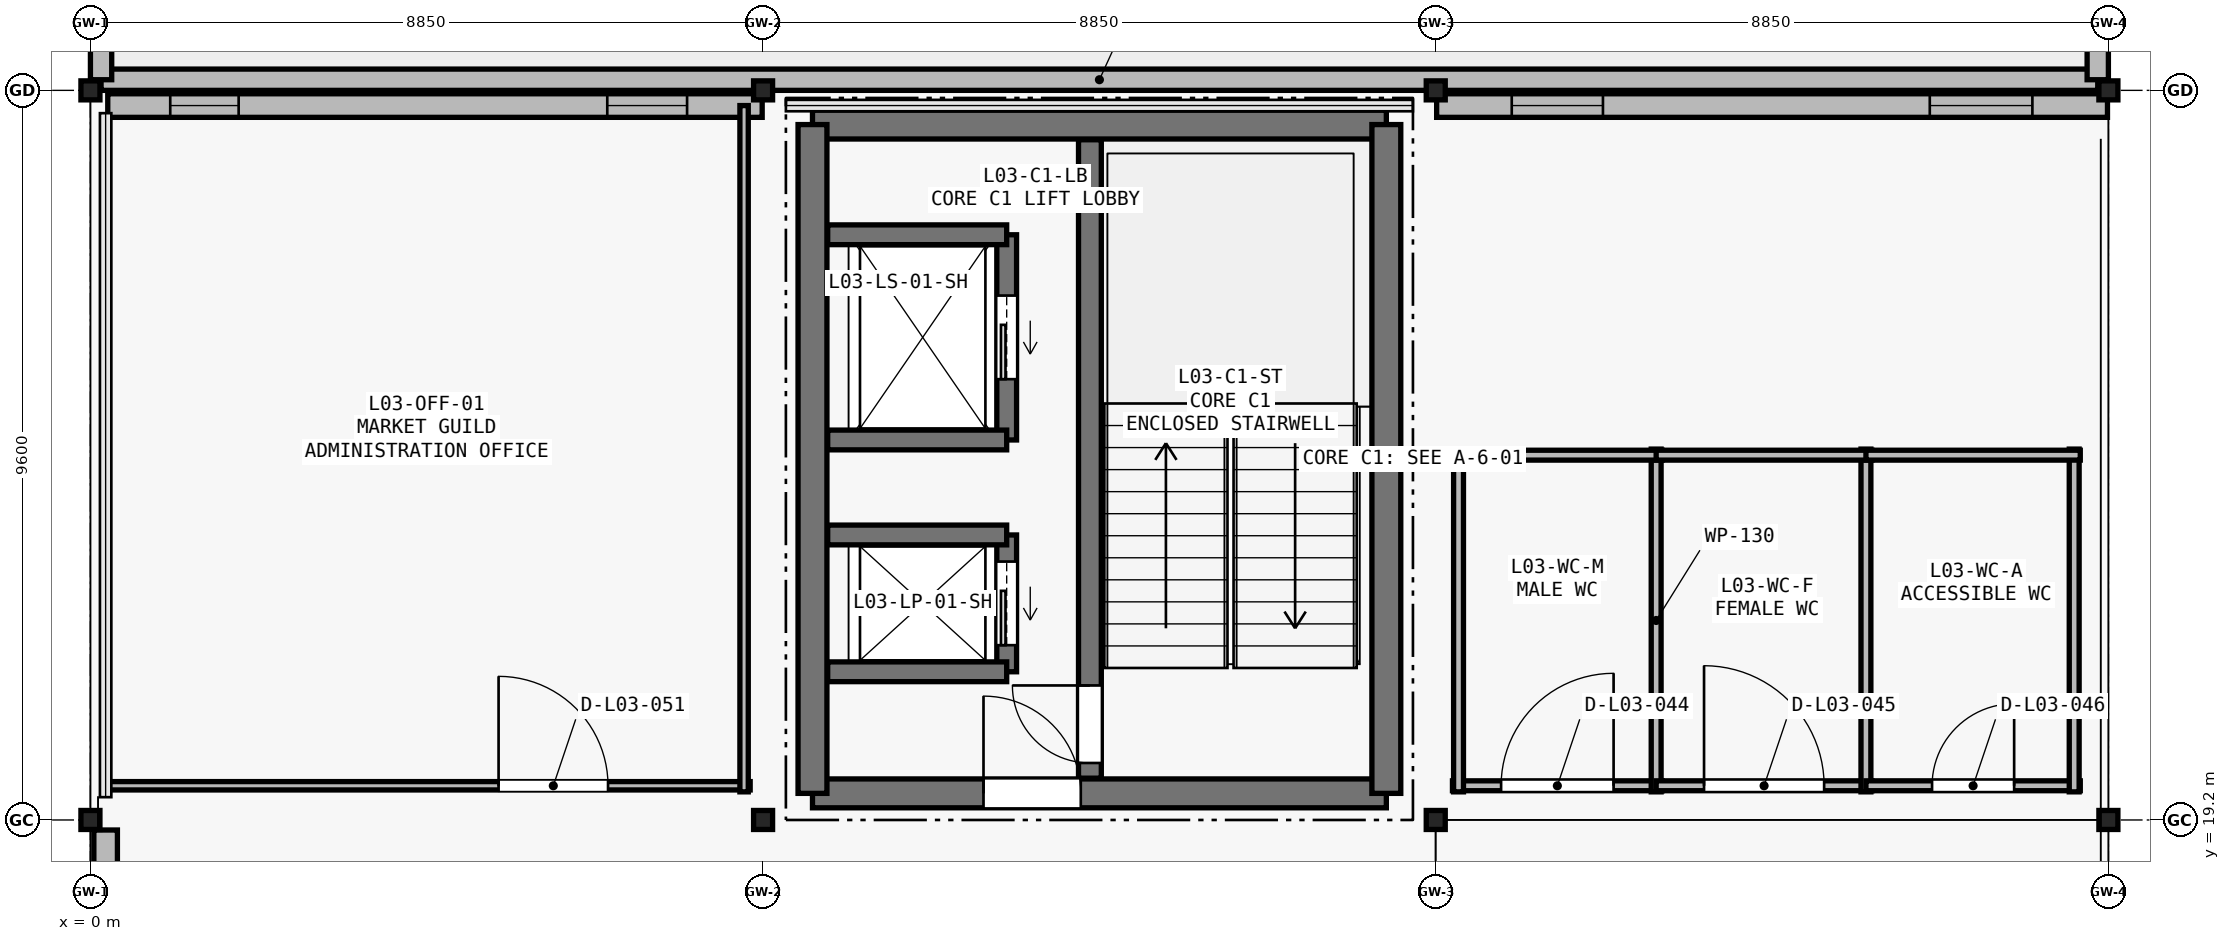
"""IFC4 building model, lengths in metres.
Left out: names, types, materials, properties, quantities, classifications, styles, units other than length and angle.
Written with IfcOpenShell. Run it as: python <this file> out.ifc"""

import sys

from ifc_helpers import new_model, si_unit, direction, frame, frame_2d, origin, origin_2d, place, context, subcontext, project, spatial, rectangle, i_section, extrude, element, fill, save


model = new_model("IFC4")
c1 = context("Model", 3, precision=1e-05, world=origin(), true_north=direction((0.0, 1.0)))
c2 = subcontext(c1, "Body", "Model", "MODEL_VIEW")
j1 = project(units=[si_unit("LENGTHUNIT", "METRE"), si_unit("PLANEANGLEUNIT", "RADIAN")], contexts=[c1])
p1 = place(None, origin())
s1 = spatial("IfcSite", under=j1, at=p1, CompositionType="ELEMENT")
p2 = place(p1, origin())
s2 = spatial("IfcBuilding", under=s1, at=p2, CompositionType="ELEMENT")
p3 = place(p2, frame((0.0, 0.0, 15.0)))
s3 = spatial("IfcBuildingStorey", under=s2, at=p3, CompositionType="ELEMENT", Elevation=15.0)
for number, where, z_axis, x_axis in (
    (1, (0.0, 19.2, 0.0), (0.0, 0.0, 1.0), (1.0, 0.0, 0.0)),
    (2, (0.0, 28.8, 0.0), (0.0, 0.0, 1.0), (1.0, 0.0, 0.0)),
    (3, (8.85, 19.2, 0.0), (0.0, 0.0, 1.0), (1.0, 0.0, 0.0)),
    (4, (8.85, 28.8, 0.0), (0.0, 0.0, 1.0), (1.0, 0.0, 0.0)),
    (5, (17.7, 19.2, 0.0), (0.0, 0.0, 1.0), (1.0, 0.0, 0.0)),
    (6, (17.7, 28.8, 0.0), (0.0, 0.0, 1.0), (1.0, 0.0, 0.0)),
    (7, (26.55, 19.2, 0.0), (0.0, 0.0, 1.0), (1.0, 0.0, 0.0)),
    (8, (26.55, 28.8, 0.0), (0.0, 0.0, 1.0), (1.0, 0.0, 0.0)),
):
    element("IfcColumn", number, at=place(p3, frame(where, z_axis=z_axis, x_axis=x_axis)), inside=s3, PredefinedType="COLUMN", context=c2, shape_type="SweptSolid", body=[
        extrude(i_section(OverallWidth=0.25, OverallDepth=0.25, WebThickness=0.009, FlangeThickness=0.014, FilletRadius=0.016, at=origin_2d()), origin(), (0.0, 0.0, 1.0), 4.2),
    ])
p4 = place(p3, frame((0.2, 9.732, 0.0), z_axis=(0.0, 0.0, 1.0), x_axis=(0.0, 1.0, 0.0)))
e9 = element("IfcWall", 9, at=p4, inside=s3, PredefinedType="SOLIDWALL", context=c2, shape_type="SweptSolid", body=[
    extrude(rectangle(XDim=9.336, YDim=0.31, at=frame_2d((4.668, 0.0))), origin(), (0.0, 0.0, 1.0), 3.35),
])
p5 = place(p4, frame((0.868, 0.0, 0.95)))
e10 = element("IfcOpeningElement", 10, at=p5, cuts=e9, PredefinedType="OPENING", context=c2, shape_type="SweptSolid", body=[
    extrude(rectangle(XDim=1.85, YDim=1.95, at=frame_2d((0.925, 0.975))), frame((0.0, 0.165, 0.0), z_axis=(0.0, -1.0, 0.0), x_axis=(1.0, 0.0, 0.0)), (0.0, 0.0, 1.0), 0.33),
])
p6 = place(p4, frame((6.418, 0.0, 0.95)))
e11 = element("IfcOpeningElement", 11, at=p6, cuts=e9, PredefinedType="OPENING", context=c2, shape_type="SweptSolid", body=[
    extrude(rectangle(XDim=2.05, YDim=1.95, at=frame_2d((1.025, 0.975))), frame((0.0, 0.165, 0.0), z_axis=(0.0, -1.0, 0.0), x_axis=(1.0, 0.0, 0.0)), (0.0, 0.0, 1.0), 0.33),
])
p7 = place(p3, frame((0.228, 28.6, 0.0), z_axis=(0.0, 0.0, 1.0), x_axis=(1.0, 0.0, 0.0)))
e12 = element("IfcWall", 12, at=p7, inside=s3, PredefinedType="SOLIDWALL", context=c2, shape_type="SweptSolid", body=[
    extrude(rectangle(XDim=8.61, YDim=0.31, at=frame_2d((4.305, 0.0))), origin(), (0.0, 0.0, 1.0), 3.35),
])
p8 = place(p7, frame((0.822, 0.0, 0.95)))
e13 = element("IfcOpeningElement", 13, at=p8, cuts=e12, PredefinedType="OPENING", context=c2, shape_type="SweptSolid", body=[
    extrude(rectangle(XDim=0.9, YDim=1.8, at=frame_2d((0.45, 0.9))), frame((0.0, 0.165, 0.0), z_axis=(0.0, -1.0, 0.0), x_axis=(1.0, 0.0, 0.0)), (0.0, 0.0, 1.0), 0.33),
])
p9 = place(p7, frame((6.572, 0.0, 0.95)))
e14 = element("IfcOpeningElement", 14, at=p9, cuts=e12, PredefinedType="OPENING", context=c2, shape_type="SweptSolid", body=[
    extrude(rectangle(XDim=1.05, YDim=1.8, at=frame_2d((0.525, 0.9))), frame((0.0, 0.165, 0.0), z_axis=(0.0, -1.0, 0.0), x_axis=(1.0, 0.0, 0.0)), (0.0, 0.0, 1.0), 0.33),
])
p10 = place(p3, frame((17.712, 28.6, 0.0), z_axis=(0.0, 0.0, 1.0), x_axis=(1.0, 0.0, 0.0)))
e15 = element("IfcWall", 15, at=p10, inside=s3, PredefinedType="SOLIDWALL", context=c2, shape_type="SweptSolid", body=[
    extrude(rectangle(XDim=8.826, YDim=0.31, at=frame_2d((4.413, 0.0))), origin(), (0.0, 0.0, 1.0), 3.35),
])
p11 = place(p10, frame((0.988, 0.0, 0.95)))
e16 = element("IfcOpeningElement", 16, at=p11, cuts=e15, PredefinedType="OPENING", context=c2, shape_type="SweptSolid", body=[
    extrude(rectangle(XDim=1.2, YDim=1.8, at=frame_2d((0.6, 0.9))), frame((0.0, 0.165, 0.0), z_axis=(0.0, -1.0, 0.0), x_axis=(1.0, 0.0, 0.0)), (0.0, 0.0, 1.0), 0.33),
])
p12 = place(p10, frame((6.488, 0.0, 0.95)))
e17 = element("IfcOpeningElement", 17, at=p12, cuts=e15, PredefinedType="OPENING", context=c2, shape_type="SweptSolid", body=[
    extrude(rectangle(XDim=1.35, YDim=1.8, at=frame_2d((0.675, 0.9))), frame((0.0, 0.165, 0.0), z_axis=(0.0, -1.0, 0.0), x_axis=(1.0, 0.0, 0.0)), (0.0, 0.0, 1.0), 0.33),
])
p13 = place(p3, frame((0.14, 28.94, 0.01), z_axis=(0.0, 0.0, 1.0), x_axis=(1.0, 0.0, 0.0)))
e18 = element("IfcWall", 18, at=p13, inside=s3, PredefinedType="PARAPET", context=c2, shape_type="SweptSolid", body=[
    extrude(rectangle(XDim=26.27, YDim=0.28, at=frame_2d((13.135, 0.0))), origin(), (0.0, 0.0, 1.0), 1.15),
])
for number, where, z_axis, x_axis in (
    (19, (26.41, 28.94, 0.01), (0.0, 0.0, 1.0), (0.0, 1.0, 0.0)),
    (20, (0.14, 35.86, 0.01), (0.0, 0.0, 1.0), (0.0, -1.0, 0.0)),
):
    element("IfcWall", number, at=place(p3, frame(where, z_axis=z_axis, x_axis=x_axis)), inside=s3, PredefinedType="PARAPET", context=c2, shape_type="SweptSolid", body=[
        extrude(rectangle(XDim=6.92, YDim=0.28, at=frame_2d((3.46, 0.0))), origin(), (0.0, 0.0, 1.0), 1.15),
    ])
p14 = place(p3, frame((9.5, 19.55, 0.0), z_axis=(0.0, 0.0, 1.0), x_axis=(1.0, 0.0, 0.0)))
e21 = element("IfcWall", 21, at=p14, inside=s3, PredefinedType="SHEAR", context=c2, shape_type="SweptSolid", body=[
    extrude(rectangle(XDim=7.55, YDim=0.38, at=frame_2d((3.775, 0.0))), origin(), (0.0, 0.0, 1.0), 4.2),
])
p15 = place(p14, frame((2.25, 0.0, 0.0)))
e22 = element("IfcOpeningElement", 22, at=p15, cuts=e21, PredefinedType="OPENING", context=c2, shape_type="SweptSolid", body=[
    extrude(rectangle(XDim=1.28, YDim=2.15, at=frame_2d((0.64, 1.075))), frame((0.0, 0.2, 0.0), z_axis=(0.0, -1.0, 0.0), x_axis=(1.0, 0.0, 0.0)), (0.0, 0.0, 1.0), 0.4),
])
p16 = place(p3, frame((17.05, 28.35, 0.0), z_axis=(0.0, 0.0, 1.0), x_axis=(-1.0, 0.0, 0.0)))
e23 = element("IfcWall", 23, at=p16, inside=s3, PredefinedType="SHEAR", context=c2, shape_type="SweptSolid", body=[
    extrude(rectangle(XDim=7.55, YDim=0.38, at=frame_2d((3.775, 0.0))), origin(), (0.0, 0.0, 1.0), 4.2),
])
for number, where, z_axis, x_axis in (
    (24, (9.5, 28.35, 0.0), (0.0, 0.0, 1.0), (0.0, -1.0, 0.0)),
    (25, (17.05, 19.55, 0.0), (0.0, 0.0, 1.0), (0.0, 1.0, 0.0)),
):
    element("IfcWall", number, at=place(p3, frame(where, z_axis=z_axis, x_axis=x_axis)), inside=s3, PredefinedType="SHEAR", context=c2, shape_type="SweptSolid", body=[
        extrude(rectangle(XDim=8.8, YDim=0.38, at=frame_2d((4.4, 0.0))), origin(), (0.0, 0.0, 1.0), 4.2),
    ])
p17 = place(p3, frame((13.15, 19.75, 0.0), z_axis=(0.0, 0.0, 1.0), x_axis=(0.0, 1.0, 0.0)))
e26 = element("IfcWall", 26, at=p17, inside=s3, PredefinedType="SHEAR", context=c2, shape_type="SweptSolid", body=[
    extrude(rectangle(XDim=8.4, YDim=0.3, at=frame_2d((4.2, 0.0))), origin(), (0.0, 0.0, 1.0), 4.2),
])
p18 = place(p17, frame((0.2, 0.0, 0.0)))
e27 = element("IfcOpeningElement", 27, at=p18, cuts=e26, PredefinedType="OPENING", context=c2, shape_type="SweptSolid", body=[
    extrude(rectangle(XDim=1.02, YDim=2.1, at=frame_2d((0.51, 1.05))), frame((0.0, 0.16, 0.0), z_axis=(0.0, -1.0, 0.0), x_axis=(1.0, 0.0, 0.0)), (0.0, 0.0, 1.0), 0.32),
])
p19 = place(p3, frame((12.055, 21.15, 0.0), z_axis=(0.0, 0.0, 1.0), x_axis=(0.0, 1.0, 0.0)))
e28 = element("IfcWall", 28, at=p19, inside=s3, PredefinedType="SHEAR", context=c2, shape_type="SweptSolid", body=[
    extrude(rectangle(XDim=1.8, YDim=0.26, at=frame_2d((0.9, 0.0))), origin(), (0.0, 0.0, 1.0), 4.2),
])
p20 = place(p19, frame((0.35, 0.0, 0.0)))
e29 = element("IfcOpeningElement", 29, at=p20, cuts=e28, PredefinedType="OPENING", context=c2, shape_type="SweptSolid", body=[
    extrude(rectangle(XDim=1.1, YDim=2.15, at=frame_2d((0.55, 1.075))), frame((0.0, 0.14, 0.0), z_axis=(0.0, -1.0, 0.0), x_axis=(1.0, 0.0, 0.0)), (0.0, 0.0, 1.0), 0.28),
])
for number, where, z_axis, x_axis in (
    (30, (9.7, 21.15, 0.0), (0.0, 0.0, 1.0), (1.0, 0.0, 0.0)),
    (31, (9.7, 22.95, 0.0), (0.0, 0.0, 1.0), (1.0, 0.0, 0.0)),
):
    element("IfcWall", number, at=place(p3, frame(where, z_axis=z_axis, x_axis=x_axis)), inside=s3, PredefinedType="SHEAR", context=c2, shape_type="SweptSolid", body=[
        extrude(rectangle(XDim=2.355, YDim=0.26, at=frame_2d((1.177, 0.0))), origin(), (0.0, 0.0, 1.0), 4.2),
    ])
p21 = place(p3, frame((12.055, 24.2, 0.0), z_axis=(0.0, 0.0, 1.0), x_axis=(0.0, 1.0, 0.0)))
e32 = element("IfcWall", 32, at=p21, inside=s3, PredefinedType="SHEAR", context=c2, shape_type="SweptSolid", body=[
    extrude(rectangle(XDim=2.7, YDim=0.26, at=frame_2d((1.35, 0.0))), origin(), (0.0, 0.0, 1.0), 4.2),
])
p22 = place(p21, frame((0.8, 0.0, 0.0)))
e33 = element("IfcOpeningElement", 33, at=p22, cuts=e32, PredefinedType="OPENING", context=c2, shape_type="SweptSolid", body=[
    extrude(rectangle(XDim=1.1, YDim=2.15, at=frame_2d((0.55, 1.075))), frame((0.0, 0.14, 0.0), z_axis=(0.0, -1.0, 0.0), x_axis=(1.0, 0.0, 0.0)), (0.0, 0.0, 1.0), 0.28),
])
for number, where, z_axis, x_axis in (
    (34, (9.7, 24.2, 0.0), (0.0, 0.0, 1.0), (1.0, 0.0, 0.0)),
    (35, (9.7, 26.9, 0.0), (0.0, 0.0, 1.0), (1.0, 0.0, 0.0)),
):
    element("IfcWall", number, at=place(p3, frame(where, z_axis=z_axis, x_axis=x_axis)), inside=s3, PredefinedType="SHEAR", context=c2, shape_type="SweptSolid", body=[
        extrude(rectangle(XDim=2.355, YDim=0.26, at=frame_2d((1.177, 0.0))), origin(), (0.0, 0.0, 1.0), 4.2),
    ])
p23 = place(p3, frame((17.92, 19.65, 0.0), z_axis=(0.0, 0.0, 1.0), x_axis=(1.0, 0.0, 0.0)))
e36 = element("IfcWall", 36, at=p23, inside=s3, PredefinedType="PARTITIONING", context=c2, shape_type="SweptSolid", body=[
    extrude(rectangle(XDim=2.76, YDim=0.13, at=frame_2d((1.38, 0.0))), origin(), (0.0, 0.0, 1.0), 3.72),
])
p24 = place(p23, frame((0.64, 0.0, 0.0)))
e37 = element("IfcOpeningElement", 37, at=p24, cuts=e36, PredefinedType="OPENING", context=c2, shape_type="SweptSolid", body=[
    extrude(rectangle(XDim=1.48, YDim=2.36, at=frame_2d((0.74, 1.18))), frame((0.0, 0.075, 0.0), z_axis=(0.0, -1.0, 0.0), x_axis=(1.0, 0.0, 0.0)), (0.0, 0.0, 1.0), 0.15),
])
p25 = place(p3, frame((20.6, 19.57, 0.0), z_axis=(0.0, 0.0, 1.0), x_axis=(0.0, 1.0, 0.0)))
e38 = element("IfcWall", 38, at=p25, inside=s3, PredefinedType="PARTITIONING", context=c2, shape_type="SweptSolid", body=[
    extrude(rectangle(XDim=4.51, YDim=0.13, at=frame_2d((2.255, 0.0))), origin(), (0.0, 0.0, 1.0), 3.55),
])
p26 = place(p3, frame((18.0, 24.08, 0.0), z_axis=(0.0, 0.0, 1.0), x_axis=(0.0, -1.0, 0.0)))
e39 = element("IfcWall", 39, at=p26, inside=s3, PredefinedType="PARTITIONING", context=c2, shape_type="SweptSolid", body=[
    extrude(rectangle(XDim=4.51, YDim=0.13, at=frame_2d((2.255, 0.0))), origin(), (0.0, 0.0, 1.0), 3.72),
])
p27 = place(p3, frame((20.68, 24.0, 0.0), z_axis=(0.0, 0.0, 1.0), x_axis=(-1.0, 0.0, 0.0)))
e40 = element("IfcWall", 40, at=p27, inside=s3, PredefinedType="PARTITIONING", context=c2, shape_type="SweptSolid", body=[
    extrude(rectangle(XDim=2.76, YDim=0.13, at=frame_2d((1.38, 0.0))), origin(), (0.0, 0.0, 1.0), 3.72),
])
p28 = place(p3, frame((20.6, 19.65, 0.0), z_axis=(0.0, 0.0, 1.0), x_axis=(1.0, 0.0, 0.0)))
e41 = element("IfcWall", 41, at=p28, inside=s3, PredefinedType="PARTITIONING", context=c2, shape_type="SweptSolid", body=[
    extrude(rectangle(XDim=2.84, YDim=0.13, at=frame_2d((1.42, 0.0))), origin(), (0.0, 0.0, 1.0), 3.72),
])
p29 = place(p28, frame((0.63, 0.0, 0.0)))
e42 = element("IfcOpeningElement", 42, at=p29, cuts=e41, PredefinedType="OPENING", context=c2, shape_type="SweptSolid", body=[
    extrude(rectangle(XDim=1.58, YDim=2.36, at=frame_2d((0.79, 1.18))), frame((0.0, 0.075, 0.0), z_axis=(0.0, -1.0, 0.0), x_axis=(1.0, 0.0, 0.0)), (0.0, 0.0, 1.0), 0.15),
])
p30 = place(p3, frame((23.36, 19.57, 0.0), z_axis=(0.0, 0.0, 1.0), x_axis=(0.0, 1.0, 0.0)))
e43 = element("IfcWall", 43, at=p30, inside=s3, PredefinedType="PARTITIONING", context=c2, shape_type="SweptSolid", body=[
    extrude(rectangle(XDim=4.51, YDim=0.13, at=frame_2d((2.255, 0.0))), origin(), (0.0, 0.0, 1.0), 3.72),
])
p31 = place(p3, frame((23.44, 24.0, 0.0), z_axis=(0.0, 0.0, 1.0), x_axis=(-1.0, 0.0, 0.0)))
e44 = element("IfcWall", 44, at=p31, inside=s3, PredefinedType="PARTITIONING", context=c2, shape_type="SweptSolid", body=[
    extrude(rectangle(XDim=2.84, YDim=0.13, at=frame_2d((1.42, 0.0))), origin(), (0.0, 0.0, 1.0), 3.72),
])
p32 = place(p3, frame((23.36, 19.65, 0.0), z_axis=(0.0, 0.0, 1.0), x_axis=(1.0, 0.0, 0.0)))
e45 = element("IfcWall", 45, at=p32, inside=s3, PredefinedType="PARTITIONING", context=c2, shape_type="SweptSolid", body=[
    extrude(rectangle(XDim=2.82, YDim=0.13, at=frame_2d((1.41, 0.0))), origin(), (0.0, 0.0, 1.0), 3.72),
])
p33 = place(p32, frame((0.87, 0.0, 0.0)))
e46 = element("IfcOpeningElement", 46, at=p33, cuts=e45, PredefinedType="OPENING", context=c2, shape_type="SweptSolid", body=[
    extrude(rectangle(XDim=1.08, YDim=2.22, at=frame_2d((0.54, 1.11))), frame((0.0, 0.075, 0.0), z_axis=(0.0, -1.0, 0.0), x_axis=(1.0, 0.0, 0.0)), (0.0, 0.0, 1.0), 0.15),
])
p34 = place(p3, frame((26.1, 19.57, 0.0), z_axis=(0.0, 0.0, 1.0), x_axis=(0.0, 1.0, 0.0)))
e47 = element("IfcWall", 47, at=p34, inside=s3, PredefinedType="PARTITIONING", context=c2, shape_type="SweptSolid", body=[
    extrude(rectangle(XDim=4.51, YDim=0.13, at=frame_2d((2.255, 0.0))), origin(), (0.0, 0.0, 1.0), 3.72),
])
p35 = place(p3, frame((26.18, 24.0, 0.0), z_axis=(0.0, 0.0, 1.0), x_axis=(-1.0, 0.0, 0.0)))
e48 = element("IfcWall", 48, at=p35, inside=s3, PredefinedType="PARTITIONING", context=c2, shape_type="SweptSolid", body=[
    extrude(rectangle(XDim=2.82, YDim=0.13, at=frame_2d((1.41, 0.0))), origin(), (0.0, 0.0, 1.0), 3.72),
])
p36 = place(p3, frame((0.2, 19.65, 0.0), z_axis=(0.0, 0.0, 1.0), x_axis=(1.0, 0.0, 0.0)))
e49 = element("IfcWall", 49, at=p36, inside=s3, PredefinedType="PARTITIONING", context=c2, shape_type="SweptSolid", body=[
    extrude(rectangle(XDim=8.48, YDim=0.11, at=frame_2d((4.24, 0.0))), origin(), (0.0, 0.0, 1.0), 3.72),
])
p37 = place(p36, frame((5.17, 0.0, 0.0)))
e50 = element("IfcOpeningElement", 50, at=p37, cuts=e49, PredefinedType="OPENING", context=c2, shape_type="SweptSolid", body=[
    extrude(rectangle(XDim=1.44, YDim=2.28, at=frame_2d((0.72, 1.14))), frame((0.0, 0.065, 0.0), z_axis=(0.0, -1.0, 0.0), x_axis=(1.0, 0.0, 0.0)), (0.0, 0.0, 1.0), 0.13),
])
p38 = place(p3, frame((8.6, 19.57, 0.0), z_axis=(0.0, 0.0, 1.0), x_axis=(0.0, 1.0, 0.0)))
e51 = element("IfcWall", 51, at=p38, inside=s3, PredefinedType="PARTITIONING", context=c2, shape_type="SweptSolid", body=[
    extrude(rectangle(XDim=9.03, YDim=0.11, at=frame_2d((4.515, 0.0))), origin(), (0.0, 0.0, 1.0), 3.72),
])
p39 = place(p8, origin())
e52 = element("IfcWindow", 52, at=p39, inside=s3, PartitioningType="SINGLE_PANEL", PredefinedType="WINDOW", context=c2, shape_type="SweptSolid", body=[
    extrude(rectangle(XDim=0.9, YDim=1.8, at=frame_2d((0.45, 0.9))), frame((0.0, 0.03, 0.0), z_axis=(0.0, -1.0, 0.0), x_axis=(1.0, 0.0, 0.0)), (0.0, 0.0, 1.0), 0.06),
])
fill(e13, e52)
p40 = place(p9, origin())
e53 = element("IfcWindow", 53, at=p40, inside=s3, PartitioningType="SINGLE_PANEL", PredefinedType="WINDOW", context=c2, shape_type="SweptSolid", body=[
    extrude(rectangle(XDim=1.05, YDim=1.8, at=frame_2d((0.525, 0.9))), frame((0.0, 0.03, 0.0), z_axis=(0.0, -1.0, 0.0), x_axis=(1.0, 0.0, 0.0)), (0.0, 0.0, 1.0), 0.06),
])
fill(e14, e53)
p41 = place(p11, origin())
e54 = element("IfcWindow", 54, at=p41, inside=s3, PartitioningType="SINGLE_PANEL", PredefinedType="WINDOW", context=c2, shape_type="SweptSolid", body=[
    extrude(rectangle(XDim=1.2, YDim=1.8, at=frame_2d((0.6, 0.9))), frame((0.0, 0.03, 0.0), z_axis=(0.0, -1.0, 0.0), x_axis=(1.0, 0.0, 0.0)), (0.0, 0.0, 1.0), 0.06),
])
fill(e16, e54)
p42 = place(p12, origin())
e55 = element("IfcWindow", 55, at=p42, inside=s3, PartitioningType="SINGLE_PANEL", PredefinedType="WINDOW", context=c2, shape_type="SweptSolid", body=[
    extrude(rectangle(XDim=1.35, YDim=1.8, at=frame_2d((0.675, 0.9))), frame((0.0, 0.03, 0.0), z_axis=(0.0, -1.0, 0.0), x_axis=(1.0, 0.0, 0.0)), (0.0, 0.0, 1.0), 0.06),
])
fill(e17, e55)
p43 = place(p15, origin())
e56 = element("IfcDoor", 56, at=p43, inside=s3, OperationType="SINGLE_SWING_LEFT", PredefinedType="DOOR", context=c2, shape_type="SweptSolid", body=[
    extrude(rectangle(XDim=1.28, YDim=2.15, at=frame_2d((0.64, 1.075))), frame((0.0, 0.025, 0.0), z_axis=(0.0, -1.0, 0.0), x_axis=(1.0, 0.0, 0.0)), (0.0, 0.0, 1.0), 0.05),
])
fill(e22, e56)
p44 = place(p18, origin())
e57 = element("IfcDoor", 57, at=p44, inside=s3, OperationType="SINGLE_SWING_RIGHT", PredefinedType="DOOR", context=c2, shape_type="SweptSolid", body=[
    extrude(rectangle(XDim=1.02, YDim=2.1, at=frame_2d((0.51, 1.05))), frame((0.0, 0.025, 0.0), z_axis=(0.0, -1.0, 0.0), x_axis=(1.0, 0.0, 0.0)), (0.0, 0.0, 1.0), 0.05),
])
fill(e27, e57)
p45 = place(p20, origin())
e58 = element("IfcDoor", 58, at=p45, inside=s3, OperationType="SLIDING_TO_LEFT", PredefinedType="DOOR", context=c2, shape_type="SweptSolid", body=[
    extrude(rectangle(XDim=1.1, YDim=2.15, at=frame_2d((0.55, 1.075))), frame((0.0, 0.025, 0.0), z_axis=(0.0, -1.0, 0.0), x_axis=(1.0, 0.0, 0.0)), (0.0, 0.0, 1.0), 0.05),
])
fill(e29, e58)
p46 = place(p22, origin())
e59 = element("IfcDoor", 59, at=p46, inside=s3, OperationType="SLIDING_TO_LEFT", PredefinedType="DOOR", context=c2, shape_type="SweptSolid", body=[
    extrude(rectangle(XDim=1.1, YDim=2.15, at=frame_2d((0.55, 1.075))), frame((0.0, 0.025, 0.0), z_axis=(0.0, -1.0, 0.0), x_axis=(1.0, 0.0, 0.0)), (0.0, 0.0, 1.0), 0.05),
])
fill(e33, e59)
p47 = place(p24, origin())
e60 = element("IfcDoor", 60, at=p47, inside=s3, OperationType="SINGLE_SWING_RIGHT", PredefinedType="DOOR", context=c2, shape_type="SweptSolid", body=[
    extrude(rectangle(XDim=1.48, YDim=2.36, at=frame_2d((0.74, 1.18))), frame((0.0, 0.025, 0.0), z_axis=(0.0, -1.0, 0.0), x_axis=(1.0, 0.0, 0.0)), (0.0, 0.0, 1.0), 0.05),
])
fill(e37, e60)
p48 = place(p29, origin())
e61 = element("IfcDoor", 61, at=p48, inside=s3, OperationType="SINGLE_SWING_LEFT", PredefinedType="DOOR", context=c2, shape_type="SweptSolid", body=[
    extrude(rectangle(XDim=1.58, YDim=2.36, at=frame_2d((0.79, 1.18))), frame((0.0, 0.025, 0.0), z_axis=(0.0, -1.0, 0.0), x_axis=(1.0, 0.0, 0.0)), (0.0, 0.0, 1.0), 0.05),
])
fill(e42, e61)
p49 = place(p33, origin())
e62 = element("IfcDoor", 62, at=p49, inside=s3, OperationType="SINGLE_SWING_RIGHT", PredefinedType="DOOR", context=c2, shape_type="SweptSolid", body=[
    extrude(rectangle(XDim=1.08, YDim=2.22, at=frame_2d((0.54, 1.11))), frame((0.0, 0.025, 0.0), z_axis=(0.0, -1.0, 0.0), x_axis=(1.0, 0.0, 0.0)), (0.0, 0.0, 1.0), 0.05),
])
fill(e46, e62)
p50 = place(p37, origin())
e63 = element("IfcDoor", 63, at=p50, inside=s3, OperationType="SINGLE_SWING_LEFT", PredefinedType="DOOR", context=c2, shape_type="SweptSolid", body=[
    extrude(rectangle(XDim=1.44, YDim=2.28, at=frame_2d((0.72, 1.14))), frame((0.0, 0.025, 0.0), z_axis=(0.0, -1.0, 0.0), x_axis=(1.0, 0.0, 0.0)), (0.0, 0.0, 1.0), 0.05),
])
fill(e50, e63)
save(model, sys.argv[1])
